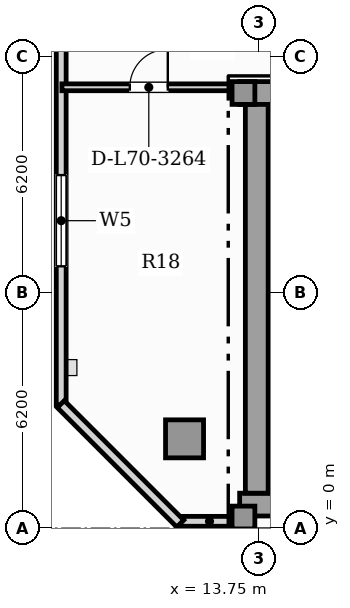
"""IFC4 building model, lengths in metres.
Left out: names, types, materials, properties, quantities, classifications, styles, units other than length and angle.
Written with IfcOpenShell. Run it as: python <this file> out.ifc"""

import sys

from ifc_helpers import new_model, si_unit, direction, frame, frame_2d, origin, origin_2d, place, context, subcontext, project, spatial, rectangle, hollow_rectangle, extrude, element, fill, save


model = new_model("IFC4")
c1 = context("Model", 3, precision=1e-05, world=origin(), true_north=direction((0.0, 1.0)))
c2 = subcontext(c1, "Body", "Model", "MODEL_VIEW")
j1 = project(units=[si_unit("LENGTHUNIT", "METRE"), si_unit("PLANEANGLEUNIT", "RADIAN")], contexts=[c1])
p1 = place(None, origin())
s1 = spatial("IfcSite", under=j1, at=p1, CompositionType="ELEMENT")
p2 = place(p1, origin())
s2 = spatial("IfcBuilding", under=s1, at=p2, CompositionType="ELEMENT")
p3 = place(p2, frame((0.0, 0.0, 284.9)))
s3 = spatial("IfcBuildingStorey", under=s2, at=p3, CompositionType="ELEMENT", Elevation=284.9)
p4 = place(p3, frame((13.25, 0.62, 0.0), z_axis=(0.0, 0.0, 1.0), x_axis=(1.0, 0.0, 0.0)))
e1 = element("IfcWall", 1, at=p4, inside=s3, PredefinedType="SHEAR", context=c2, shape_type="SweptSolid", body=[
    extrude(rectangle(XDim=31.0, YDim=0.6, at=frame_2d((15.5, 0.0))), origin(), (0.0, 0.0, 1.0), 3.65),
])
p5 = place(p3, frame((13.7, 0.92, 0.0), z_axis=(0.0, 0.0, 1.0), x_axis=(0.0, 1.0, 0.0)))
e2 = element("IfcWall", 2, at=p5, inside=s3, PredefinedType="SHEAR", context=c2, shape_type="SweptSolid", body=[
    extrude(rectangle(XDim=10.53, YDim=0.6, at=frame_2d((5.265, 0.0))), origin(), (0.0, 0.0, 1.0), 3.65),
])
p6 = place(p3, frame((13.25, 11.45, 0.0), z_axis=(0.0, 0.0, 1.0), x_axis=(1.0, 0.0, 0.0)))
e3 = element("IfcWall", 3, at=p6, inside=s3, PredefinedType="SHEAR", context=c2, shape_type="SweptSolid", body=[
    extrude(rectangle(XDim=2.95, YDim=0.6, at=frame_2d((1.475, 0.0))), origin(), (0.0, 0.0, 1.0), 3.65),
])
for number, where, z_axis, x_axis in (
    (4, (13.35, 0.28, 0.0), (0.0, 0.0, 1.0), (1.0, 0.0, 0.0)),
    (5, (13.35, 11.45, 0.0), (0.0, 0.0, 1.0), (1.0, 0.0, 0.0)),
):
    element("IfcColumn", number, at=place(p3, frame(where, z_axis=z_axis, x_axis=x_axis)), inside=s3, PredefinedType="COLUMN", context=c2, shape_type="SweptSolid", body=[
        extrude(rectangle(XDim=0.6, YDim=0.6, at=origin_2d()), origin(), (0.0, 0.0, 1.0), 3.85),
    ])
p7 = place(p3, frame((11.8, 2.35, 0.0), z_axis=(0.0, 0.0, 1.0), x_axis=(1.0, 0.0, 0.0)))
e6 = element("IfcColumn", 6, at=p7, inside=s3, PredefinedType="USERDEFINED", context=c2, shape_type="SweptSolid", body=[
    extrude(hollow_rectangle(XDim=1.0, YDim=1.0, WallThickness=0.06, at=origin_2d()), origin(), (0.0, 0.0, 1.0), 3.85),
])
p8 = place(p3, frame((11.664, 0.18, 0.0), z_axis=(0.0, 0.0, 1.0), x_axis=(1.0, 0.0, 0.0)))
e7 = element("IfcWall", 7, at=p8, inside=s3, PredefinedType="SOLIDWALL", context=c2, shape_type="SweptSolid", body=[
    extrude(rectangle(XDim=1.586, YDim=0.26, at=frame_2d((0.793, 0.0))), origin(), (0.0, 0.0, 1.0), 3.65),
])
p9 = place(p3, frame((8.554, 17.623, 0.0), z_axis=(0.0, 0.0, 1.0), x_axis=(0.0, -1.0, 0.0)))
e8 = element("IfcWall", 8, at=p9, inside=s3, PredefinedType="SOLIDWALL", context=c2, shape_type="SweptSolid", body=[
    extrude(rectangle(XDim=14.383, YDim=0.26, at=frame_2d((7.192, 0.0))), origin(), (0.0, 0.0, 1.0), 3.65),
])
p10 = place(p9, frame((8.333, 0.0, 0.85)))
e9 = element("IfcOpeningElement", 9, at=p10, cuts=e8, PredefinedType="OPENING", context=c2, shape_type="SweptSolid", body=[
    extrude(rectangle(XDim=2.4, YDim=2.0, at=frame_2d((1.2, 1.0))), frame((0.0, 0.14, 0.0), z_axis=(0.0, -1.0, 0.0), x_axis=(1.0, 0.0, 0.0)), (0.0, 0.0, 1.0), 0.28),
])
p11 = place(p3, frame((8.544, 3.264, 0.0), z_axis=(0.0, 0.0, 1.0), x_axis=(0.707079321262, -0.707134240044, 0.0)))
e10 = element("IfcWall", 10, at=p11, inside=s3, PredefinedType="SOLIDWALL", context=c2, shape_type="SweptSolid", body=[
    extrude(rectangle(XDim=4.446, YDim=0.26, at=frame_2d((2.223, 0.0))), origin(), (0.0, 0.0, 1.0), 3.65),
])
p12 = place(p3, frame((14.04, 8.52, 0.0), z_axis=(0.0, 0.0, 1.0), x_axis=(1.0, 0.0, 0.0)))
e11 = element("IfcWall", 11, at=p12, inside=s3, PredefinedType="SOLIDWALL", context=c2, shape_type="SweptSolid", body=[
    extrude(rectangle(XDim=3.4, YDim=0.22, at=frame_2d((1.7, 0.0))), origin(), (0.0, 0.0, 1.0), 3.65),
])
p13 = place(p12, frame((1.125, 0.0, 0.0)))
e12 = element("IfcOpeningElement", 12, at=p13, cuts=e11, PredefinedType="OPENING", context=c2, shape_type="SweptSolid", body=[
    extrude(rectangle(XDim=1.15, YDim=2.2, at=frame_2d((0.575, 1.1))), frame((0.0, 0.12, 0.0), z_axis=(0.0, -1.0, 0.0), x_axis=(1.0, 0.0, 0.0)), (0.0, 0.0, 1.0), 0.24),
])
p14 = place(p3, frame((8.574, 11.6, 0.0), z_axis=(0.0, 0.0, 1.0), x_axis=(1.0, 0.0, 0.0)))
e13 = element("IfcWall", 13, at=p14, inside=s3, PredefinedType="PARTITIONING", context=c2, shape_type="SweptSolid", body=[
    extrude(rectangle(XDim=4.571, YDim=0.18, at=frame_2d((2.286, 0.0))), origin(), (0.0, 0.0, 1.0), 3.65),
])
p15 = place(p14, frame((1.786, 0.0, 0.0)))
e14 = element("IfcOpeningElement", 14, at=p15, cuts=e13, PredefinedType="OPENING", context=c2, shape_type="SweptSolid", body=[
    extrude(rectangle(XDim=1.0, YDim=2.15, at=frame_2d((0.5, 1.075))), frame((0.0, 0.1, 0.0), z_axis=(0.0, -1.0, 0.0), x_axis=(1.0, 0.0, 0.0)), (0.0, 0.0, 1.0), 0.2),
])
p16 = place(p10, origin())
e15 = element("IfcWindow", 15, at=p16, inside=s3, PartitioningType="SINGLE_PANEL", PredefinedType="WINDOW", context=c2, shape_type="SweptSolid", body=[
    extrude(rectangle(XDim=2.4, YDim=2.0, at=frame_2d((1.2, 1.0))), frame((0.0, 0.03, 0.0), z_axis=(0.0, -1.0, 0.0), x_axis=(1.0, 0.0, 0.0)), (0.0, 0.0, 1.0), 0.06),
])
fill(e9, e15)
p17 = place(p15, origin())
e16 = element("IfcDoor", 16, at=p17, inside=s3, OperationType="SINGLE_SWING_RIGHT", PredefinedType="DOOR", context=c2, shape_type="SweptSolid", body=[
    extrude(rectangle(XDim=1.0, YDim=2.15, at=frame_2d((0.5, 1.075))), frame((0.0, 0.025, 0.0), z_axis=(0.0, -1.0, 0.0), x_axis=(1.0, 0.0, 0.0)), (0.0, 0.0, 1.0), 0.05),
])
fill(e14, e16)
save(model, sys.argv[1])
